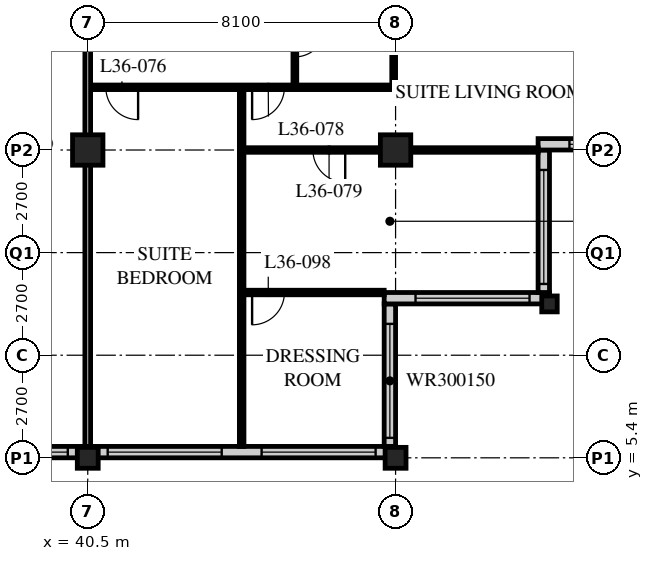
"""IFC4 building model, lengths in metres.
Left out: names, types, materials, properties, quantities, classifications, styles, units other than length and angle.
Written with IfcOpenShell. Run it as: python <this file> out.ifc"""

import sys

from ifc_helpers import new_model, si_unit, direction, frame, frame_2d, origin, origin_2d, place, context, subcontext, project, spatial, rectangle, hollow_rectangle, i_section, extrude, element, fill, save


model = new_model("IFC4")
c1 = context("Model", 3, precision=1e-05, world=origin(), true_north=direction((0.0, 1.0)))
c2 = subcontext(c1, "Body", "Model", "MODEL_VIEW")
j1 = project(units=[si_unit("LENGTHUNIT", "METRE"), si_unit("PLANEANGLEUNIT", "RADIAN")], contexts=[c1])
p1 = place(None, origin())
s1 = spatial("IfcSite", under=j1, at=p1, CompositionType="ELEMENT")
p2 = place(p1, origin())
s2 = spatial("IfcBuilding", under=s1, at=p2, CompositionType="ELEMENT")
p3 = place(p2, frame((0.0, 0.0, 140.8)))
s3 = spatial("IfcBuildingStorey", under=s2, at=p3, CompositionType="ELEMENT", Elevation=140.8)
p4 = place(p3, frame((40.5, 5.4, 0.0), z_axis=(0.0, 0.0, 1.0), x_axis=(1.0, 0.0, 0.0)))
e1 = element("IfcColumn", 1, at=p4, inside=s3, PredefinedType="COLUMN", context=c2, shape_type="SweptSolid", body=[
    extrude(hollow_rectangle(XDim=0.55, YDim=0.55, WallThickness=0.04, at=origin_2d()), origin(), (0.0, 0.0, 1.0), 3.4),
])
p5 = place(p3, frame((40.5, 13.5, 0.0), z_axis=(0.0, 0.0, 1.0), x_axis=(1.0, 0.0, 0.0)))
e2 = element("IfcColumn", 2, at=p5, inside=s3, PredefinedType="COLUMN", context=c2, shape_type="SweptSolid", body=[
    extrude(hollow_rectangle(XDim=0.8, YDim=0.8, WallThickness=0.08, at=origin_2d()), origin(), (0.0, 0.0, 1.0), 3.4),
])
p6 = place(p3, frame((48.6, 5.4, 0.0), z_axis=(0.0, 0.0, 1.0), x_axis=(1.0, 0.0, 0.0)))
e3 = element("IfcColumn", 3, at=p6, inside=s3, PredefinedType="COLUMN", context=c2, shape_type="SweptSolid", body=[
    extrude(hollow_rectangle(XDim=0.55, YDim=0.55, WallThickness=0.04, at=origin_2d()), origin(), (0.0, 0.0, 1.0), 3.4),
])
p7 = place(p3, frame((48.6, 13.5, 0.0), z_axis=(0.0, 0.0, 1.0), x_axis=(1.0, 0.0, 0.0)))
e4 = element("IfcColumn", 4, at=p7, inside=s3, PredefinedType="COLUMN", context=c2, shape_type="SweptSolid", body=[
    extrude(hollow_rectangle(XDim=0.8, YDim=0.8, WallThickness=0.08, at=origin_2d()), origin(), (0.0, 0.0, 1.0), 3.4),
])
p8 = place(p3, frame((52.65, 9.45, 0.0), z_axis=(0.0, 0.0, 1.0), x_axis=(1.0, 0.0, 0.0)))
e5 = element("IfcColumn", 5, at=p8, inside=s3, PredefinedType="COLUMN", context=c2, shape_type="SweptSolid", body=[
    extrude(i_section(OverallWidth=0.407, OverallDepth=0.419, WebThickness=0.031, FlangeThickness=0.049, FilletRadius=0.015, at=origin_2d()), origin(), (0.0, 0.0, 1.0), 3.4),
])
p9 = place(p3, frame((8.4, 5.55, 0.0), z_axis=(0.0, 0.0, 1.0), x_axis=(1.0, 0.0, 0.0)))
e6 = element("IfcWall", 6, at=p9, inside=s3, PredefinedType="SOLIDWALL", context=c2, shape_type="SweptSolid", body=[
    extrude(rectangle(XDim=40.2, YDim=0.3, at=frame_2d((20.1, 0.0))), origin(), (0.0, 0.0, 1.0), 3.19),
])
p10 = place(p9, frame((0.225, 0.0, 0.9)))
e7 = element("IfcOpeningElement", 7, at=p10, cuts=e6, PredefinedType="OPENING", context=c2, shape_type="SweptSolid", body=[
    extrude(rectangle(XDim=3.0, YDim=2.0, at=frame_2d((1.5, 1.0))), frame((0.0, 0.16, 0.0), z_axis=(0.0, -1.0, 0.0), x_axis=(1.0, 0.0, 0.0)), (0.0, 0.0, 1.0), 0.32),
])
p11 = place(p9, frame((4.275, 0.0, 0.9)))
e8 = element("IfcOpeningElement", 8, at=p11, cuts=e6, PredefinedType="OPENING", context=c2, shape_type="SweptSolid", body=[
    extrude(rectangle(XDim=3.0, YDim=2.0, at=frame_2d((1.5, 1.0))), frame((0.0, 0.16, 0.0), z_axis=(0.0, -1.0, 0.0), x_axis=(1.0, 0.0, 0.0)), (0.0, 0.0, 1.0), 0.32),
])
p12 = place(p9, frame((8.325, 0.0, 0.9)))
e9 = element("IfcOpeningElement", 9, at=p12, cuts=e6, PredefinedType="OPENING", context=c2, shape_type="SweptSolid", body=[
    extrude(rectangle(XDim=3.0, YDim=2.0, at=frame_2d((1.5, 1.0))), frame((0.0, 0.16, 0.0), z_axis=(0.0, -1.0, 0.0), x_axis=(1.0, 0.0, 0.0)), (0.0, 0.0, 1.0), 0.32),
])
p13 = place(p9, frame((12.375, 0.0, 0.9)))
e10 = element("IfcOpeningElement", 10, at=p13, cuts=e6, PredefinedType="OPENING", context=c2, shape_type="SweptSolid", body=[
    extrude(rectangle(XDim=3.0, YDim=2.0, at=frame_2d((1.5, 1.0))), frame((0.0, 0.16, 0.0), z_axis=(0.0, -1.0, 0.0), x_axis=(1.0, 0.0, 0.0)), (0.0, 0.0, 1.0), 0.32),
])
p14 = place(p9, frame((16.425, 0.0, 0.9)))
e11 = element("IfcOpeningElement", 11, at=p14, cuts=e6, PredefinedType="OPENING", context=c2, shape_type="SweptSolid", body=[
    extrude(rectangle(XDim=3.0, YDim=2.0, at=frame_2d((1.5, 1.0))), frame((0.0, 0.16, 0.0), z_axis=(0.0, -1.0, 0.0), x_axis=(1.0, 0.0, 0.0)), (0.0, 0.0, 1.0), 0.32),
])
p15 = place(p9, frame((20.475, 0.0, 0.9)))
e12 = element("IfcOpeningElement", 12, at=p15, cuts=e6, PredefinedType="OPENING", context=c2, shape_type="SweptSolid", body=[
    extrude(rectangle(XDim=3.0, YDim=2.0, at=frame_2d((1.5, 1.0))), frame((0.0, 0.16, 0.0), z_axis=(0.0, -1.0, 0.0), x_axis=(1.0, 0.0, 0.0)), (0.0, 0.0, 1.0), 0.32),
])
p16 = place(p9, frame((24.525, 0.0, 0.9)))
e13 = element("IfcOpeningElement", 13, at=p16, cuts=e6, PredefinedType="OPENING", context=c2, shape_type="SweptSolid", body=[
    extrude(rectangle(XDim=3.0, YDim=2.0, at=frame_2d((1.5, 1.0))), frame((0.0, 0.16, 0.0), z_axis=(0.0, -1.0, 0.0), x_axis=(1.0, 0.0, 0.0)), (0.0, 0.0, 1.0), 0.32),
])
p17 = place(p9, frame((28.575, 0.0, 0.9)))
e14 = element("IfcOpeningElement", 14, at=p17, cuts=e6, PredefinedType="OPENING", context=c2, shape_type="SweptSolid", body=[
    extrude(rectangle(XDim=3.0, YDim=2.0, at=frame_2d((1.5, 1.0))), frame((0.0, 0.16, 0.0), z_axis=(0.0, -1.0, 0.0), x_axis=(1.0, 0.0, 0.0)), (0.0, 0.0, 1.0), 0.32),
])
p18 = place(p9, frame((32.625, 0.0, 0.9)))
e15 = element("IfcOpeningElement", 15, at=p18, cuts=e6, PredefinedType="OPENING", context=c2, shape_type="SweptSolid", body=[
    extrude(rectangle(XDim=3.0, YDim=2.0, at=frame_2d((1.5, 1.0))), frame((0.0, 0.16, 0.0), z_axis=(0.0, -1.0, 0.0), x_axis=(1.0, 0.0, 0.0)), (0.0, 0.0, 1.0), 0.32),
])
p19 = place(p9, frame((36.675, 0.0, 0.9)))
e16 = element("IfcOpeningElement", 16, at=p19, cuts=e6, PredefinedType="OPENING", context=c2, shape_type="SweptSolid", body=[
    extrude(rectangle(XDim=3.0, YDim=2.0, at=frame_2d((1.5, 1.0))), frame((0.0, 0.16, 0.0), z_axis=(0.0, -1.0, 0.0), x_axis=(1.0, 0.0, 0.0)), (0.0, 0.0, 1.0), 0.32),
])
p20 = place(p3, frame((48.45, 5.7, 0.0), z_axis=(0.0, 0.0, 1.0), x_axis=(0.0, 1.0, 0.0)))
e17 = element("IfcWall", 17, at=p20, inside=s3, PredefinedType="SOLIDWALL", context=c2, shape_type="SweptSolid", body=[
    extrude(rectangle(XDim=3.75, YDim=0.3, at=frame_2d((1.875, 0.0))), origin(), (0.0, 0.0, 1.0), 3.19),
])
p21 = place(p20, frame((0.225, 0.0, 0.9)))
e18 = element("IfcOpeningElement", 18, at=p21, cuts=e17, PredefinedType="OPENING", context=c2, shape_type="SweptSolid", body=[
    extrude(rectangle(XDim=3.0, YDim=1.5, at=frame_2d((1.5, 0.75))), frame((0.0, 0.16, 0.0), z_axis=(0.0, -1.0, 0.0), x_axis=(1.0, 0.0, 0.0)), (0.0, 0.0, 1.0), 0.32),
])
p22 = place(p3, frame((48.3, 9.6, 0.0), z_axis=(0.0, 0.0, 1.0), x_axis=(1.0, 0.0, 0.0)))
e19 = element("IfcWall", 19, at=p22, inside=s3, PredefinedType="SOLIDWALL", context=c2, shape_type="SweptSolid", body=[
    extrude(rectangle(XDim=4.35, YDim=0.3, at=frame_2d((2.175, 0.0))), origin(), (0.0, 0.0, 1.0), 3.19),
])
p23 = place(p22, frame((0.825, 0.0, 0.9)))
e20 = element("IfcOpeningElement", 20, at=p23, cuts=e19, PredefinedType="OPENING", context=c2, shape_type="SweptSolid", body=[
    extrude(rectangle(XDim=3.0, YDim=1.5, at=frame_2d((1.5, 0.75))), frame((0.0, 0.16, 0.0), z_axis=(0.0, -1.0, 0.0), x_axis=(1.0, 0.0, 0.0)), (0.0, 0.0, 1.0), 0.32),
])
p24 = place(p3, frame((52.5, 9.75, 0.0), z_axis=(0.0, 0.0, 1.0), x_axis=(0.0, 1.0, 0.0)))
e21 = element("IfcWall", 21, at=p24, inside=s3, PredefinedType="SOLIDWALL", context=c2, shape_type="SweptSolid", body=[
    extrude(rectangle(XDim=3.75, YDim=0.3, at=frame_2d((1.875, 0.0))), origin(), (0.0, 0.0, 1.0), 3.19),
])
p25 = place(p24, frame((0.225, 0.0, 0.9)))
e22 = element("IfcOpeningElement", 22, at=p25, cuts=e21, PredefinedType="OPENING", context=c2, shape_type="SweptSolid", body=[
    extrude(rectangle(XDim=3.0, YDim=1.5, at=frame_2d((1.5, 0.75))), frame((0.0, 0.16, 0.0), z_axis=(0.0, -1.0, 0.0), x_axis=(1.0, 0.0, 0.0)), (0.0, 0.0, 1.0), 0.32),
])
p26 = place(p3, frame((52.35, 13.65, 0.0), z_axis=(0.0, 0.0, 1.0), x_axis=(1.0, 0.0, 0.0)))
e23 = element("IfcWall", 23, at=p26, inside=s3, PredefinedType="SOLIDWALL", context=c2, shape_type="SweptSolid", body=[
    extrude(rectangle(XDim=4.35, YDim=0.3, at=frame_2d((2.175, 0.0))), origin(), (0.0, 0.0, 1.0), 3.19),
])
p27 = place(p26, frame((0.825, 0.0, 0.9)))
e24 = element("IfcOpeningElement", 24, at=p27, cuts=e23, PredefinedType="OPENING", context=c2, shape_type="SweptSolid", body=[
    extrude(rectangle(XDim=3.0, YDim=1.5, at=frame_2d((1.5, 0.75))), frame((0.0, 0.16, 0.0), z_axis=(0.0, -1.0, 0.0), x_axis=(1.0, 0.0, 0.0)), (0.0, 0.0, 1.0), 0.32),
])
p28 = place(p3, frame((40.5, 15.15, 0.0), z_axis=(0.0, 0.0, 1.0), x_axis=(1.0, 0.0, 0.0)))
e25 = element("IfcWall", 25, at=p28, inside=s3, PredefinedType="PARTITIONING", context=c2, shape_type="SweptSolid", body=[
    extrude(rectangle(XDim=8.05, YDim=0.12, at=frame_2d((4.025, 0.0))), origin(), (0.0, 0.0, 1.0), 3.19),
])
p29 = place(p28, frame((0.475, 0.0, 0.0)))
e26 = element("IfcOpeningElement", 26, at=p29, cuts=e25, PredefinedType="OPENING", context=c2, shape_type="SweptSolid", body=[
    extrude(rectangle(XDim=0.85, YDim=2.1, at=frame_2d((0.425, 1.05))), frame((0.0, 0.07, 0.0), z_axis=(0.0, -1.0, 0.0), x_axis=(1.0, 0.0, 0.0)), (0.0, 0.0, 1.0), 0.14),
])
p30 = place(p28, frame((4.325, 0.0, 0.0)))
e27 = element("IfcOpeningElement", 27, at=p30, cuts=e25, PredefinedType="OPENING", context=c2, shape_type="SweptSolid", body=[
    extrude(rectangle(XDim=0.85, YDim=2.1, at=frame_2d((0.425, 1.05))), frame((0.0, 0.07, 0.0), z_axis=(0.0, -1.0, 0.0), x_axis=(1.0, 0.0, 0.0)), (0.0, 0.0, 1.0), 0.14),
])
p31 = place(p3, frame((45.95, 17.55, 0.0), z_axis=(0.0, 0.0, 1.0), x_axis=(0.0, -1.0, 0.0)))
e28 = element("IfcWall", 28, at=p31, inside=s3, PredefinedType="PARTITIONING", context=c2, shape_type="SweptSolid", body=[
    extrude(rectangle(XDim=2.4, YDim=0.1, at=frame_2d((1.2, 0.0))), origin(), (0.0, 0.0, 1.0), 3.19),
])
p32 = place(p31, frame((0.8, 0.0, 0.0)))
e29 = element("IfcOpeningElement", 29, at=p32, cuts=e28, PredefinedType="OPENING", context=c2, shape_type="SweptSolid", body=[
    extrude(rectangle(XDim=0.8, YDim=2.1, at=frame_2d((0.4, 1.05))), frame((0.0, 0.06, 0.0), z_axis=(0.0, -1.0, 0.0), x_axis=(1.0, 0.0, 0.0)), (0.0, 0.0, 1.0), 0.12),
])
p33 = place(p3, frame((48.55, 17.55, 0.0), z_axis=(0.0, 0.0, 1.0), x_axis=(0.0, -1.0, 0.0)))
e30 = element("IfcWall", 30, at=p33, inside=s3, PredefinedType="PARTITIONING", context=c2, shape_type="SweptSolid", body=[
    extrude(rectangle(XDim=2.4, YDim=0.1, at=frame_2d((1.2, 0.0))), origin(), (0.0, 0.0, 1.0), 2.578),
])
p34 = place(p3, frame((44.55, 15.15, 0.0), z_axis=(0.0, 0.0, 1.0), x_axis=(0.0, -1.0, 0.0)))
e31 = element("IfcWall", 31, at=p34, inside=s3, PredefinedType="PARTITIONING", context=c2, shape_type="SweptSolid", body=[
    extrude(rectangle(XDim=9.45, YDim=0.12, at=frame_2d((4.725, 0.0))), origin(), (0.0, 0.0, 1.0), 3.19),
])
p35 = place(p3, frame((44.55, 13.5, 0.0), z_axis=(0.0, 0.0, 1.0), x_axis=(1.0, 0.0, 0.0)))
e32 = element("IfcWall", 32, at=p35, inside=s3, PredefinedType="PARTITIONING", context=c2, shape_type="SweptSolid", body=[
    extrude(rectangle(XDim=7.8, YDim=0.12, at=frame_2d((3.9, 0.0))), origin(), (0.0, 0.0, 1.0), 2.578),
])
p36 = place(p35, frame((1.875, 0.0, 0.0)))
e33 = element("IfcOpeningElement", 33, at=p36, cuts=e32, PredefinedType="OPENING", context=c2, shape_type="SweptSolid", body=[
    extrude(rectangle(XDim=0.85, YDim=2.1, at=frame_2d((0.425, 1.05))), frame((0.0, 0.07, 0.0), z_axis=(0.0, -1.0, 0.0), x_axis=(1.0, 0.0, 0.0)), (0.0, 0.0, 1.0), 0.14),
])
p37 = place(p3, frame((40.5, 17.55, 0.0), z_axis=(0.0, 0.0, 1.0), x_axis=(0.0, -1.0, 0.0)))
e34 = element("IfcWall", 34, at=p37, inside=s3, PredefinedType="PARTITIONING", context=c2, shape_type="SweptSolid", body=[
    extrude(rectangle(XDim=11.85, YDim=0.15, at=frame_2d((5.925, 0.0))), origin(), (0.0, 0.0, 1.0), 2.578),
])
p38 = place(p3, frame((44.55, 9.75, 0.0), z_axis=(0.0, 0.0, 1.0), x_axis=(1.0, 0.0, 0.0)))
e35 = element("IfcWall", 35, at=p38, inside=s3, PredefinedType="PARTITIONING", context=c2, shape_type="SweptSolid", body=[
    extrude(rectangle(XDim=3.75, YDim=0.12, at=frame_2d((1.875, 0.0))), origin(), (0.0, 0.0, 1.0), 3.19),
])
p39 = place(p38, frame((0.275, 0.0, 0.0)))
e36 = element("IfcOpeningElement", 36, at=p39, cuts=e35, PredefinedType="OPENING", context=c2, shape_type="SweptSolid", body=[
    extrude(rectangle(XDim=0.85, YDim=2.1, at=frame_2d((0.425, 1.05))), frame((0.0, 0.07, 0.0), z_axis=(0.0, -1.0, 0.0), x_axis=(1.0, 0.0, 0.0)), (0.0, 0.0, 1.0), 0.14),
])
p40 = place(p17, origin())
e37 = element("IfcWindow", 37, at=p40, inside=s3, PartitioningType="SINGLE_PANEL", PredefinedType="WINDOW", context=c2, shape_type="SweptSolid", body=[
    extrude(rectangle(XDim=3.0, YDim=2.0, at=frame_2d((1.5, 1.0))), frame((0.0, 0.03, 0.0), z_axis=(0.0, -1.0, 0.0), x_axis=(1.0, 0.0, 0.0)), (0.0, 0.0, 1.0), 0.06),
])
fill(e14, e37)
p41 = place(p18, origin())
e38 = element("IfcWindow", 38, at=p41, inside=s3, PartitioningType="SINGLE_PANEL", PredefinedType="WINDOW", context=c2, shape_type="SweptSolid", body=[
    extrude(rectangle(XDim=3.0, YDim=2.0, at=frame_2d((1.5, 1.0))), frame((0.0, 0.03, 0.0), z_axis=(0.0, -1.0, 0.0), x_axis=(1.0, 0.0, 0.0)), (0.0, 0.0, 1.0), 0.06),
])
fill(e15, e38)
p42 = place(p19, origin())
e39 = element("IfcWindow", 39, at=p42, inside=s3, PartitioningType="SINGLE_PANEL", PredefinedType="WINDOW", context=c2, shape_type="SweptSolid", body=[
    extrude(rectangle(XDim=3.0, YDim=2.0, at=frame_2d((1.5, 1.0))), frame((0.0, 0.03, 0.0), z_axis=(0.0, -1.0, 0.0), x_axis=(1.0, 0.0, 0.0)), (0.0, 0.0, 1.0), 0.06),
])
fill(e16, e39)
p43 = place(p21, origin())
e40 = element("IfcWindow", 40, at=p43, inside=s3, PartitioningType="SINGLE_PANEL", PredefinedType="WINDOW", context=c2, shape_type="SweptSolid", body=[
    extrude(rectangle(XDim=3.0, YDim=1.5, at=frame_2d((1.5, 0.75))), frame((0.0, 0.03, 0.0), z_axis=(0.0, -1.0, 0.0), x_axis=(1.0, 0.0, 0.0)), (0.0, 0.0, 1.0), 0.06),
])
fill(e18, e40)
p44 = place(p23, origin())
e41 = element("IfcWindow", 41, at=p44, inside=s3, PartitioningType="SINGLE_PANEL", PredefinedType="WINDOW", context=c2, shape_type="SweptSolid", body=[
    extrude(rectangle(XDim=3.0, YDim=1.5, at=frame_2d((1.5, 0.75))), frame((0.0, 0.03, 0.0), z_axis=(0.0, -1.0, 0.0), x_axis=(1.0, 0.0, 0.0)), (0.0, 0.0, 1.0), 0.06),
])
fill(e20, e41)
p45 = place(p25, origin())
e42 = element("IfcWindow", 42, at=p45, inside=s3, PartitioningType="SINGLE_PANEL", PredefinedType="WINDOW", context=c2, shape_type="SweptSolid", body=[
    extrude(rectangle(XDim=3.0, YDim=1.5, at=frame_2d((1.5, 0.75))), frame((0.0, 0.03, 0.0), z_axis=(0.0, -1.0, 0.0), x_axis=(1.0, 0.0, 0.0)), (0.0, 0.0, 1.0), 0.06),
])
fill(e22, e42)
p46 = place(p27, origin())
e43 = element("IfcWindow", 43, at=p46, inside=s3, PartitioningType="SINGLE_PANEL", PredefinedType="WINDOW", context=c2, shape_type="SweptSolid", body=[
    extrude(rectangle(XDim=3.0, YDim=1.5, at=frame_2d((1.5, 0.75))), frame((0.0, 0.03, 0.0), z_axis=(0.0, -1.0, 0.0), x_axis=(1.0, 0.0, 0.0)), (0.0, 0.0, 1.0), 0.06),
])
fill(e24, e43)
p47 = place(p29, origin())
e44 = element("IfcDoor", 44, at=p47, inside=s3, OperationType="SINGLE_SWING_LEFT", PredefinedType="DOOR", context=c2, shape_type="SweptSolid", body=[
    extrude(rectangle(XDim=0.85, YDim=2.1, at=frame_2d((0.425, 1.05))), frame((0.0, 0.025, 0.0), z_axis=(0.0, -1.0, 0.0), x_axis=(1.0, 0.0, 0.0)), (0.0, 0.0, 1.0), 0.05),
])
fill(e26, e44)
p48 = place(p32, origin())
e45 = element("IfcDoor", 45, at=p48, inside=s3, OperationType="SINGLE_SWING_LEFT", PredefinedType="DOOR", context=c2, shape_type="SweptSolid", body=[
    extrude(rectangle(XDim=0.8, YDim=2.1, at=frame_2d((0.4, 1.05))), frame((0.0, 0.025, 0.0), z_axis=(0.0, -1.0, 0.0), x_axis=(1.0, 0.0, 0.0)), (0.0, 0.0, 1.0), 0.05),
])
fill(e29, e45)
p49 = place(p30, origin())
e46 = element("IfcDoor", 46, at=p49, inside=s3, OperationType="SINGLE_SWING_RIGHT", PredefinedType="DOOR", context=c2, shape_type="SweptSolid", body=[
    extrude(rectangle(XDim=0.85, YDim=2.1, at=frame_2d((0.425, 1.05))), frame((0.0, 0.025, 0.0), z_axis=(0.0, -1.0, 0.0), x_axis=(1.0, 0.0, 0.0)), (0.0, 0.0, 1.0), 0.05),
])
fill(e27, e46)
p50 = place(p36, origin())
e47 = element("IfcDoor", 47, at=p50, inside=s3, OperationType="SINGLE_SWING_LEFT", PredefinedType="DOOR", context=c2, shape_type="SweptSolid", body=[
    extrude(rectangle(XDim=0.85, YDim=2.1, at=frame_2d((0.425, 1.05))), frame((0.0, 0.025, 0.0), z_axis=(0.0, -1.0, 0.0), x_axis=(1.0, 0.0, 0.0)), (0.0, 0.0, 1.0), 0.05),
])
fill(e33, e47)
p51 = place(p39, origin())
e48 = element("IfcDoor", 48, at=p51, inside=s3, OperationType="SINGLE_SWING_RIGHT", PredefinedType="DOOR", context=c2, shape_type="SweptSolid", body=[
    extrude(rectangle(XDim=0.85, YDim=2.1, at=frame_2d((0.425, 1.05))), frame((0.0, 0.025, 0.0), z_axis=(0.0, -1.0, 0.0), x_axis=(1.0, 0.0, 0.0)), (0.0, 0.0, 1.0), 0.05),
])
fill(e36, e48)
save(model, sys.argv[1])
